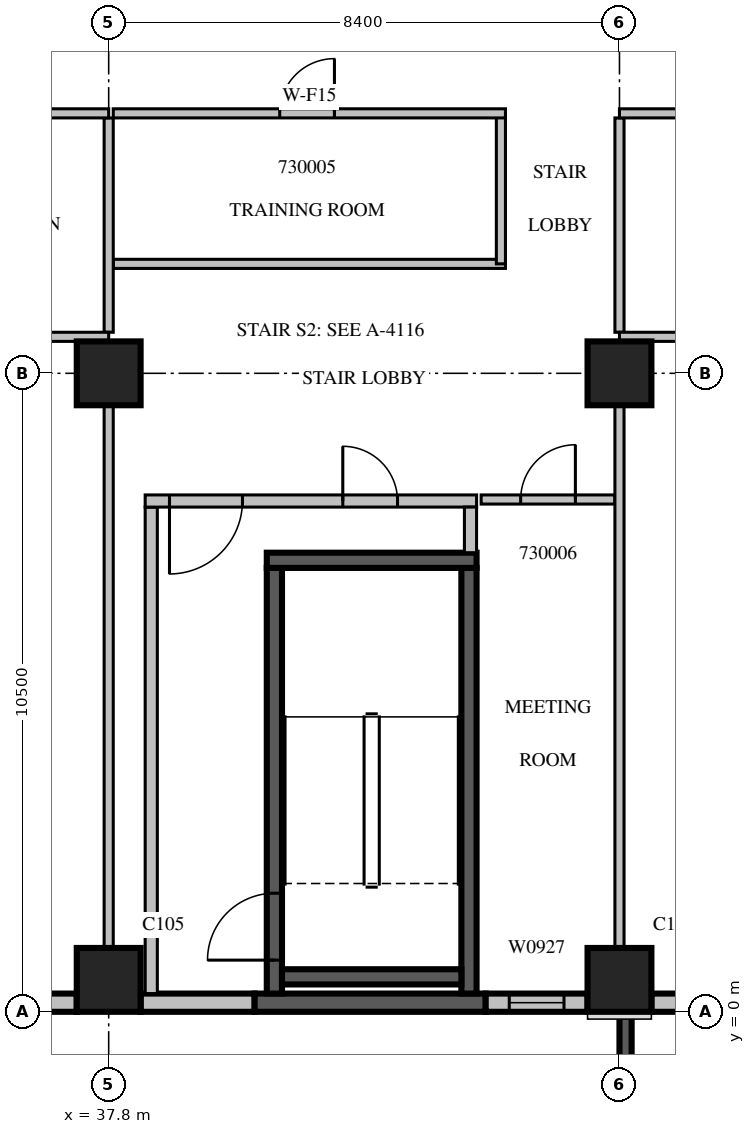
"""IFC4 building model, lengths in metres.
Left out: names, types, materials, properties, quantities, classifications, styles, units other than length and angle.
Written with IfcOpenShell. Run it as: python <this file> out.ifc"""

import sys

from ifc_helpers import new_model, si_unit, direction, frame, frame_2d, origin, origin_2d, place, context, subcontext, project, spatial, rectangle, extrude, source, transform, mapped, element, fill, save


model = new_model("IFC4")
c1 = context("Model", 3, precision=1e-05, world=origin(), true_north=direction((0.0, 1.0)))
c2 = subcontext(c1, "Body", "Model", "MODEL_VIEW")
j1 = project(units=[si_unit("LENGTHUNIT", "METRE"), si_unit("PLANEANGLEUNIT", "RADIAN")], contexts=[c1])
p1 = place(None, origin())
s1 = spatial("IfcSite", under=j1, at=p1, CompositionType="ELEMENT")
p2 = place(p1, origin())
s2 = spatial("IfcBuilding", under=s1, at=p2, CompositionType="ELEMENT")
p3 = place(p2, frame((0.0, 0.0, 137.1)))
s3 = spatial("IfcBuildingStorey", under=s2, at=p3, CompositionType="ELEMENT", Elevation=137.1)
m1 = source(origin(), c2, "Body", "SweptSolid", [
    extrude(rectangle(XDim=1.05, YDim=1.05, at=origin_2d()), origin(), (0.0, 0.0, 1.0), 4.2),
])
for number, where, z_axis, x_axis in (
    (1, (37.8, 0.525, 0.0), (0.0, 0.0, 1.0), (1.0, 0.0, 0.0)),
    (2, (46.2, 0.525, 0.0), (0.0, 0.0, 1.0), (1.0, 0.0, 0.0)),
    (3, (37.8, 10.5, 0.0), (0.0, 0.0, 1.0), (1.0, 0.0, 0.0)),
    (4, (46.2, 10.5, 0.0), (0.0, 0.0, 1.0), (1.0, 0.0, 0.0)),
):
    element("IfcColumn", number, at=place(p3, frame(where, z_axis=z_axis, x_axis=x_axis)), inside=s3, PredefinedType="COLUMN", context=c2, shape_type="MappedRepresentation", body=[
        mapped(m1, transform((0.0, 0.0, 0.0), scale=1.0)),
    ])
m2 = source(origin(), c2, "Body", "SweptSolid", [
    extrude(rectangle(XDim=3.9, YDim=0.2, at=frame_2d((1.95, 0.0))), origin(), (0.0, 0.0, 1.0), 3.8),
])
p4 = place(p3, frame((46.3, 0.0, 0.0), z_axis=(0.0, 0.0, 1.0), x_axis=(0.0, -1.0, 0.0)))
e5 = element("IfcWall", 5, at=p4, inside=s3, PredefinedType="SOLIDWALL", context=c2, shape_type="MappedRepresentation", body=[
    mapped(m2, transform((0.0, 0.0, 0.0), scale=1.0)),
])
m3 = source(origin(), c2, "Body", "SweptSolid", [
    extrude(rectangle(XDim=2.4, YDim=2.7, at=frame_2d((1.2, 1.35))), frame((0.0, 0.11, 0.0), z_axis=(0.0, -1.0, 0.0), x_axis=(1.0, 0.0, 0.0)), (0.0, 0.0, 1.0), 0.22),
])
p5 = place(p4, frame((0.75, 0.0, 0.6)))
e6 = element("IfcOpeningElement", 6, at=p5, cuts=e5, PredefinedType="OPENING", context=c2, shape_type="MappedRepresentation", body=[
    mapped(m3, transform((0.0, 0.0, 0.0), scale=1.0)),
])
m4 = source(origin(), c2, "Body", "SweptSolid", [
    extrude(rectangle(XDim=7.35, YDim=0.3, at=frame_2d((3.675, 0.0))), origin(), (0.0, 0.0, 1.0), 3.8),
])
p6 = place(p3, frame((29.925, 0.15, 0.0), z_axis=(0.0, 0.0, 1.0), x_axis=(1.0, 0.0, 0.0)))
e7 = element("IfcWall", 7, at=p6, inside=s3, PredefinedType="STANDARD", context=c2, shape_type="MappedRepresentation", body=[
    mapped(m4, transform((0.0, 0.0, 0.0), scale=1.0)),
])
m5 = source(origin(), c2, "Body", "SweptSolid", [
    extrude(rectangle(XDim=2.4, YDim=2.7, at=frame_2d((1.2, 1.35))), frame((0.0, 0.16, 0.0), z_axis=(0.0, -1.0, 0.0), x_axis=(1.0, 0.0, 0.0)), (0.0, 0.0, 1.0), 0.32),
])
p7 = place(p6, frame((2.575, 0.0, 0.6)))
e8 = element("IfcOpeningElement", 8, at=p7, cuts=e7, PredefinedType="OPENING", context=c2, shape_type="MappedRepresentation", body=[
    mapped(m5, transform((0.0, 0.0, 0.0), scale=1.0)),
])
m6 = source(origin(), c2, "Body", "SweptSolid", [
    extrude(rectangle(XDim=1.875, YDim=0.3, at=frame_2d((0.938, 0.0))), origin(), (0.0, 0.0, 1.0), 3.8),
])
p8 = place(p3, frame((38.325, 0.15, 0.0), z_axis=(0.0, 0.0, 1.0), x_axis=(1.0, 0.0, 0.0)))
e9 = element("IfcWall", 9, at=p8, inside=s3, PredefinedType="STANDARD", context=c2, shape_type="MappedRepresentation", body=[
    mapped(m6, transform((0.0, 0.0, 0.0), scale=1.0)),
])
m7 = source(origin(), c2, "Body", "SweptSolid", [
    extrude(rectangle(XDim=3.8, YDim=0.3, at=frame_2d((1.9, 0.0))), origin(), (0.0, 0.0, 1.0), 3.8),
])
p9 = place(p3, frame((40.2, 0.15, 0.0), z_axis=(0.0, 0.0, 1.0), x_axis=(1.0, 0.0, 0.0)))
e10 = element("IfcWall", 10, at=p9, inside=s3, PredefinedType="SOLIDWALL", context=c2, shape_type="MappedRepresentation", body=[
    mapped(m7, transform((0.0, 0.0, 0.0), scale=1.0)),
])
m8 = source(origin(), c2, "Body", "SweptSolid", [
    extrude(rectangle(XDim=1.675, YDim=0.3, at=frame_2d((0.838, 0.0))), origin(), (0.0, 0.0, 1.0), 3.8),
])
p10 = place(p3, frame((44.0, 0.15, 0.0), z_axis=(0.0, 0.0, 1.0), x_axis=(1.0, 0.0, 0.0)))
e11 = element("IfcWall", 11, at=p10, inside=s3, PredefinedType="STANDARD", context=c2, shape_type="MappedRepresentation", body=[
    mapped(m8, transform((0.0, 0.0, 0.0), scale=1.0)),
])
m9 = source(origin(), c2, "Body", "SweptSolid", [
    extrude(rectangle(XDim=0.9, YDim=2.7, at=frame_2d((0.45, 1.35))), frame((0.0, 0.16, 0.0), z_axis=(0.0, -1.0, 0.0), x_axis=(1.0, 0.0, 0.0)), (0.0, 0.0, 1.0), 0.32),
])
p11 = place(p10, frame((0.388, 0.0, 0.6)))
e12 = element("IfcOpeningElement", 12, at=p11, cuts=e11, PredefinedType="OPENING", context=c2, shape_type="MappedRepresentation", body=[
    mapped(m9, transform((0.0, 0.0, 0.0), scale=1.0)),
])
m10 = source(origin(), c2, "Body", "SweptSolid", [
    extrude(rectangle(XDim=4.83, YDim=0.3, at=frame_2d((2.415, 0.0))), origin(), (0.0, 0.0, 1.0), 3.8),
])
p12 = place(p3, frame((46.725, 0.15, 0.0), z_axis=(0.0, 0.0, 1.0), x_axis=(1.0, 0.0, 0.0)))
e13 = element("IfcWall", 13, at=p12, inside=s3, PredefinedType="STANDARD", context=c2, shape_type="MappedRepresentation", body=[
    mapped(m10, transform((0.0, 0.0, 0.0), scale=1.0)),
])
m11 = source(origin(), c2, "Body", "SweptSolid", [
    extrude(rectangle(XDim=1.0, YDim=2.1, at=frame_2d((0.5, 1.05))), frame((0.0, 0.16, 0.0), z_axis=(0.0, -1.0, 0.0), x_axis=(1.0, 0.0, 0.0)), (0.0, 0.0, 1.0), 0.32),
])
p13 = place(p12, frame((1.915, 0.0, 0.0)))
e14 = element("IfcOpeningElement", 14, at=p13, cuts=e13, PredefinedType="OPENING", context=c2, shape_type="MappedRepresentation", body=[
    mapped(m11, transform((0.0, 0.0, 0.0), scale=1.0)),
])
m12 = source(origin(), c2, "Body", "SweptSolid", [
    extrude(rectangle(XDim=7.0, YDim=0.25, at=frame_2d((3.5, 0.0))), origin(), (0.0, 0.0, 1.0), 3.8),
])
p14 = place(p3, frame((40.525, 0.3, 0.0), z_axis=(0.0, 0.0, 1.0), x_axis=(0.0, 1.0, 0.0)))
e15 = element("IfcWall", 15, at=p14, inside=s3, PredefinedType="SOLIDWALL", context=c2, shape_type="MappedRepresentation", body=[
    mapped(m12, transform((0.0, 0.0, 0.0), scale=1.0)),
])
m13 = source(origin(), c2, "Body", "SweptSolid", [
    extrude(rectangle(XDim=1.1, YDim=2.1, at=frame_2d((0.55, 1.05))), frame((0.0, 0.135, 0.0), z_axis=(0.0, -1.0, 0.0), x_axis=(1.0, 0.0, 0.0)), (0.0, 0.0, 1.0), 0.27),
])
p15 = place(p14, frame((0.55, 0.0, 0.0)))
e16 = element("IfcOpeningElement", 16, at=p15, cuts=e15, PredefinedType="OPENING", context=c2, shape_type="MappedRepresentation", body=[
    mapped(m13, transform((0.0, 0.0, 0.0), scale=1.0)),
])
p16 = place(p3, frame((43.725, 0.3, 0.0), z_axis=(0.0, 0.0, 1.0), x_axis=(0.0, 1.0, 0.0)))
e17 = element("IfcWall", 17, at=p16, inside=s3, PredefinedType="SOLIDWALL", context=c2, shape_type="MappedRepresentation", body=[
    mapped(m12, transform((0.0, 0.0, 0.0), scale=1.0)),
])
m14 = source(origin(), c2, "Body", "SweptSolid", [
    extrude(rectangle(XDim=3.45, YDim=0.25, at=frame_2d((1.725, 0.0))), origin(), (0.0, 0.0, 1.0), 3.8),
])
p17 = place(p3, frame((40.4, 7.425, 0.0), z_axis=(0.0, 0.0, 1.0), x_axis=(1.0, 0.0, 0.0)))
e18 = element("IfcWall", 18, at=p17, inside=s3, PredefinedType="SOLIDWALL", context=c2, shape_type="MappedRepresentation", body=[
    mapped(m14, transform((0.0, 0.0, 0.0), scale=1.0)),
])
m15 = source(origin(), c2, "Body", "SweptSolid", [
    extrude(rectangle(XDim=2.95, YDim=0.25, at=frame_2d((1.475, 0.0))), origin(), (0.0, 0.0, 1.0), 3.8),
])
p18 = place(p3, frame((40.65, 0.575, 0.0), z_axis=(0.0, 0.0, 1.0), x_axis=(1.0, 0.0, 0.0)))
e19 = element("IfcWall", 19, at=p18, inside=s3, PredefinedType="SOLIDWALL", context=c2, shape_type="MappedRepresentation", body=[
    mapped(m15, transform((0.0, 0.0, 0.0), scale=1.0)),
])
m16 = source(origin(), c2, "Body", "SweptSolid", [
    extrude(rectangle(XDim=8.0, YDim=0.2, at=frame_2d((4.0, 0.0))), origin(), (0.0, 0.0, 1.0), 3.8),
])
p19 = place(p3, frame((38.5, 0.3, 0.0), z_axis=(0.0, 0.0, 1.0), x_axis=(0.0, 1.0, 0.0)))
e20 = element("IfcWall", 20, at=p19, inside=s3, PredefinedType="PARTITIONING", context=c2, shape_type="MappedRepresentation", body=[
    mapped(m16, transform((0.0, 0.0, 0.0), scale=1.0)),
])
m17 = source(origin(), c2, "Body", "SweptSolid", [
    extrude(rectangle(XDim=5.45, YDim=0.2, at=frame_2d((2.725, 0.0))), origin(), (0.0, 0.0, 1.0), 3.8),
])
p20 = place(p3, frame((38.4, 8.4, 0.0), z_axis=(0.0, 0.0, 1.0), x_axis=(1.0, 0.0, 0.0)))
e21 = element("IfcWall", 21, at=p20, inside=s3, PredefinedType="PARTITIONING", context=c2, shape_type="MappedRepresentation", body=[
    mapped(m17, transform((0.0, 0.0, 0.0), scale=1.0)),
])
m18 = source(origin(), c2, "Body", "SweptSolid", [
    extrude(rectangle(XDim=1.2, YDim=2.1, at=frame_2d((0.6, 1.05))), frame((0.0, 0.11, 0.0), z_axis=(0.0, -1.0, 0.0), x_axis=(1.0, 0.0, 0.0)), (0.0, 0.0, 1.0), 0.22),
])
p21 = place(p20, frame((0.4, 0.0, 0.0)))
e22 = element("IfcOpeningElement", 22, at=p21, cuts=e21, PredefinedType="OPENING", context=c2, shape_type="MappedRepresentation", body=[
    mapped(m18, transform((0.0, 0.0, 0.0), scale=1.0)),
])
m19 = source(origin(), c2, "Body", "SweptSolid", [
    extrude(rectangle(XDim=0.9, YDim=2.1, at=frame_2d((0.45, 1.05))), frame((0.0, 0.11, 0.0), z_axis=(0.0, -1.0, 0.0), x_axis=(1.0, 0.0, 0.0)), (0.0, 0.0, 1.0), 0.22),
])
p22 = place(p20, frame((3.25, 0.0, 0.0)))
e23 = element("IfcOpeningElement", 23, at=p22, cuts=e21, PredefinedType="OPENING", context=c2, shape_type="MappedRepresentation", body=[
    mapped(m19, transform((0.0, 0.0, 0.0), scale=1.0)),
])
m20 = source(origin(), c2, "Body", "SweptSolid", [
    extrude(rectangle(XDim=0.75, YDim=0.2, at=frame_2d((0.375, 0.0))), origin(), (0.0, 0.0, 1.0), 3.8),
])
p23 = place(p3, frame((43.75, 7.55, 0.0), z_axis=(0.0, 0.0, 1.0), x_axis=(0.0, 1.0, 0.0)))
e24 = element("IfcWall", 24, at=p23, inside=s3, PredefinedType="PARTITIONING", context=c2, shape_type="MappedRepresentation", body=[
    mapped(m20, transform((0.0, 0.0, 0.0), scale=1.0)),
])
m21 = source(origin(), c2, "Body", "SweptSolid", [
    extrude(rectangle(XDim=6.45, YDim=0.15, at=frame_2d((3.225, 0.0))), origin(), (0.0, 0.0, 1.0), 3.8),
])
p24 = place(p3, frame((37.875, 12.3, 0.0), z_axis=(0.0, 0.0, 1.0), x_axis=(1.0, 0.0, 0.0)))
e25 = element("IfcWall", 25, at=p24, inside=s3, PredefinedType="PARTITIONING", context=c2, shape_type="MappedRepresentation", body=[
    mapped(m21, transform((0.0, 0.0, 0.0), scale=1.0)),
])
m22 = source(origin(), c2, "Body", "SweptSolid", [
    extrude(rectangle(XDim=2.475, YDim=0.15, at=frame_2d((1.238, 0.0))), origin(), (0.0, 0.0, 1.0), 3.8),
])
p25 = place(p3, frame((44.25, 12.3, 0.0), z_axis=(0.0, 0.0, 1.0), x_axis=(0.0, 1.0, 0.0)))
e26 = element("IfcWall", 26, at=p25, inside=s3, PredefinedType="PARTITIONING", context=c2, shape_type="MappedRepresentation", body=[
    mapped(m22, transform((0.0, 0.0, 0.0), scale=1.0)),
])
p26 = place(p3, frame((44.325, 14.775, 0.0), z_axis=(0.0, 0.0, 1.0), x_axis=(-1.0, 0.0, 0.0)))
e27 = element("IfcWall", 27, at=p26, inside=s3, PredefinedType="PARTITIONING", context=c2, shape_type="MappedRepresentation", body=[
    mapped(m21, transform((0.0, 0.0, 0.0), scale=1.0)),
])
m23 = source(origin(), c2, "Body", "SweptSolid", [
    extrude(rectangle(XDim=0.9, YDim=2.1, at=frame_2d((0.45, 1.05))), frame((0.0, 0.085, 0.0), z_axis=(0.0, -1.0, 0.0), x_axis=(1.0, 0.0, 0.0)), (0.0, 0.0, 1.0), 0.17),
])
p27 = place(p26, frame((2.812, 0.0, 0.0)))
e28 = element("IfcOpeningElement", 28, at=p27, cuts=e27, PredefinedType="OPENING", context=c2, shape_type="MappedRepresentation", body=[
    mapped(m23, transform((0.0, 0.0, 0.0), scale=1.0)),
])
m24 = source(origin(), c2, "Body", "SweptSolid", [
    extrude(rectangle(XDim=2.2, YDim=0.15, at=frame_2d((1.1, 0.0))), origin(), (0.0, 0.0, 1.0), 3.8),
])
p28 = place(p3, frame((46.125, 8.425, 0.0), z_axis=(0.0, 0.0, 1.0), x_axis=(-1.0, 0.0, 0.0)))
e29 = element("IfcWall", 29, at=p28, inside=s3, PredefinedType="PARTITIONING", context=c2, shape_type="MappedRepresentation", body=[
    mapped(m24, transform((0.0, 0.0, 0.0), scale=1.0)),
])
p29 = place(p28, frame((0.65, 0.0, 0.0)))
e30 = element("IfcOpeningElement", 30, at=p29, cuts=e29, PredefinedType="OPENING", context=c2, shape_type="MappedRepresentation", body=[
    mapped(m23, transform((0.0, 0.0, 0.0), scale=1.0)),
])
m25 = source(origin(), c2, "Body", "SweptSolid", [
    extrude(rectangle(XDim=8.927, YDim=0.15, at=frame_2d((4.463, 0.0))), origin(), (0.0, 0.0, 1.0), 3.8),
])
p30 = place(p3, frame((37.8, 1.049, 0.0), z_axis=(0.0, 0.0, 1.0), x_axis=(0.0, 1.0, 0.0)))
e31 = element("IfcWall", 31, at=p30, inside=s3, PredefinedType="PARTITIONING", context=c2, shape_type="MappedRepresentation", body=[
    mapped(m25, transform((0.0, 0.0, 0.0), scale=1.0)),
])
m26 = source(origin(), c2, "Body", "SweptSolid", [
    extrude(rectangle(XDim=3.525, YDim=0.15, at=frame_2d((1.762, 0.0))), origin(), (0.0, 0.0, 1.0), 3.8),
])
p31 = place(p3, frame((37.8, 11.175, 0.0), z_axis=(0.0, 0.0, 1.0), x_axis=(0.0, 1.0, 0.0)))
e32 = element("IfcWall", 32, at=p31, inside=s3, PredefinedType="PARTITIONING", context=c2, shape_type="MappedRepresentation", body=[
    mapped(m26, transform((0.0, 0.0, 0.0), scale=1.0)),
])
m27 = source(origin(), c2, "Body", "SweptSolid", [
    extrude(rectangle(XDim=8.4, YDim=0.15, at=frame_2d((4.2, 0.0))), origin(), (0.0, 0.0, 1.0), 3.8),
])
p32 = place(p3, frame((37.8, 11.1, 0.0), z_axis=(0.0, 0.0, 1.0), x_axis=(-1.0, 0.0, 0.0)))
e33 = element("IfcWall", 33, at=p32, inside=s3, PredefinedType="PARTITIONING", context=c2, shape_type="MappedRepresentation", body=[
    mapped(m27, transform((0.0, 0.0, 0.0), scale=1.0)),
])
m28 = source(origin(), c2, "Body", "SweptSolid", [
    extrude(rectangle(XDim=1.1, YDim=2.1, at=frame_2d((0.55, 1.05))), frame((0.0, 0.085, 0.0), z_axis=(0.0, -1.0, 0.0), x_axis=(1.0, 0.0, 0.0)), (0.0, 0.0, 1.0), 0.17),
])
p33 = place(p32, frame((1.345, 0.0, 0.0)))
e34 = element("IfcOpeningElement", 34, at=p33, cuts=e33, PredefinedType="OPENING", context=c2, shape_type="MappedRepresentation", body=[
    mapped(m28, transform((0.0, 0.0, 0.0), scale=1.0)),
])
p34 = place(p3, frame((46.2, 1.049, 0.0), z_axis=(0.0, 0.0, 1.0), x_axis=(0.0, 1.0, 0.0)))
e35 = element("IfcWall", 35, at=p34, inside=s3, PredefinedType="PARTITIONING", context=c2, shape_type="MappedRepresentation", body=[
    mapped(m25, transform((0.0, 0.0, 0.0), scale=1.0)),
])
p35 = place(p3, frame((46.2, 11.175, 0.0), z_axis=(0.0, 0.0, 1.0), x_axis=(0.0, 1.0, 0.0)))
e36 = element("IfcWall", 36, at=p35, inside=s3, PredefinedType="PARTITIONING", context=c2, shape_type="MappedRepresentation", body=[
    mapped(m26, transform((0.0, 0.0, 0.0), scale=1.0)),
])
m29 = source(origin(), c2, "Body", "SweptSolid", [
    extrude(rectangle(XDim=24.9, YDim=0.15, at=frame_2d((12.45, 0.0))), origin(), (0.0, 0.0, 1.0), 3.8),
])
p36 = place(p3, frame((71.1, 11.1, 0.0), z_axis=(0.0, 0.0, 1.0), x_axis=(-1.0, 0.0, 0.0)))
e37 = element("IfcWall", 37, at=p36, inside=s3, PredefinedType="PARTITIONING", context=c2, shape_type="MappedRepresentation", body=[
    mapped(m29, transform((0.0, 0.0, 0.0), scale=1.0)),
])
p37 = place(p36, frame((19.988, 0.0, 0.0)))
e38 = element("IfcOpeningElement", 38, at=p37, cuts=e37, PredefinedType="OPENING", context=c2, shape_type="MappedRepresentation", body=[
    mapped(m28, transform((0.0, 0.0, 0.0), scale=1.0)),
])
p38 = place(p36, frame((16.497, 0.0, 0.0)))
e39 = element("IfcOpeningElement", 39, at=p38, cuts=e37, PredefinedType="OPENING", context=c2, shape_type="MappedRepresentation", body=[
    mapped(m28, transform((0.0, 0.0, 0.0), scale=1.0)),
])
p39 = place(p36, frame((2.028, 0.0, 0.0)))
e40 = element("IfcOpeningElement", 40, at=p39, cuts=e37, PredefinedType="OPENING", context=c2, shape_type="MappedRepresentation", body=[
    mapped(m23, transform((0.0, 0.0, 0.0), scale=1.0)),
])
p40 = place(p3, frame((37.8, 14.775, 0.0), z_axis=(0.0, 0.0, 1.0), x_axis=(-1.0, 0.0, 0.0)))
e41 = element("IfcWall", 41, at=p40, inside=s3, PredefinedType="PARTITIONING", context=c2, shape_type="MappedRepresentation", body=[
    mapped(m27, transform((0.0, 0.0, 0.0), scale=1.0)),
])
p41 = place(p40, frame((1.12, 0.0, 0.0)))
e42 = element("IfcOpeningElement", 42, at=p41, cuts=e41, PredefinedType="OPENING", context=c2, shape_type="MappedRepresentation", body=[
    mapped(m28, transform((0.0, 0.0, 0.0), scale=1.0)),
])
p42 = place(p40, frame((6.744, 0.0, 0.0)))
e43 = element("IfcOpeningElement", 43, at=p42, cuts=e41, PredefinedType="OPENING", context=c2, shape_type="MappedRepresentation", body=[
    mapped(m23, transform((0.0, 0.0, 0.0), scale=1.0)),
])
p43 = place(p40, frame((4.214, 0.0, 0.0)))
e44 = element("IfcOpeningElement", 44, at=p43, cuts=e41, PredefinedType="OPENING", context=c2, shape_type="MappedRepresentation", body=[
    mapped(m23, transform((0.0, 0.0, 0.0), scale=1.0)),
])
p44 = place(p3, frame((71.1, 14.775, 0.0), z_axis=(0.0, 0.0, 1.0), x_axis=(-1.0, 0.0, 0.0)))
e45 = element("IfcWall", 45, at=p44, inside=s3, PredefinedType="PARTITIONING", context=c2, shape_type="MappedRepresentation", body=[
    mapped(m29, transform((0.0, 0.0, 0.0), scale=1.0)),
])
p45 = place(p44, frame((19.754, 0.0, 0.0)))
e46 = element("IfcOpeningElement", 46, at=p45, cuts=e45, PredefinedType="OPENING", context=c2, shape_type="MappedRepresentation", body=[
    mapped(m28, transform((0.0, 0.0, 0.0), scale=1.0)),
])
p46 = place(p44, frame((22.794, 0.0, 0.0)))
e47 = element("IfcOpeningElement", 47, at=p46, cuts=e45, PredefinedType="OPENING", context=c2, shape_type="MappedRepresentation", body=[
    mapped(m23, transform((0.0, 0.0, 0.0), scale=1.0)),
])
p47 = place(p44, frame((16.772, 0.0, 0.0)))
e48 = element("IfcOpeningElement", 48, at=p47, cuts=e45, PredefinedType="OPENING", context=c2, shape_type="MappedRepresentation", body=[
    mapped(m28, transform((0.0, 0.0, 0.0), scale=1.0)),
])
p48 = place(p44, frame((13.886, 0.0, 0.0)))
e49 = element("IfcOpeningElement", 49, at=p48, cuts=e45, PredefinedType="OPENING", context=c2, shape_type="MappedRepresentation", body=[
    mapped(m23, transform((0.0, 0.0, 0.0), scale=1.0)),
])
p49 = place(p44, frame((11.382, 0.0, 0.0)))
e50 = element("IfcOpeningElement", 50, at=p49, cuts=e45, PredefinedType="OPENING", context=c2, shape_type="MappedRepresentation", body=[
    mapped(m23, transform((0.0, 0.0, 0.0), scale=1.0)),
])
p50 = place(p44, frame((9.2, 0.0, 0.0)))
e51 = element("IfcOpeningElement", 51, at=p50, cuts=e45, PredefinedType="OPENING", context=c2, shape_type="MappedRepresentation", body=[
    mapped(m23, transform((0.0, 0.0, 0.0), scale=1.0)),
])
p51 = place(p44, frame((7.522, 0.0, 0.0)))
e52 = element("IfcOpeningElement", 52, at=p51, cuts=e45, PredefinedType="OPENING", context=c2, shape_type="MappedRepresentation", body=[
    mapped(m23, transform((0.0, 0.0, 0.0), scale=1.0)),
])
p52 = place(p44, frame((0.976, 0.0, 0.0)))
e53 = element("IfcOpeningElement", 53, at=p52, cuts=e45, PredefinedType="OPENING", context=c2, shape_type="MappedRepresentation", body=[
    mapped(m28, transform((0.0, 0.0, 0.0), scale=1.0)),
])
p53 = place(p44, frame((4.743, 0.0, 0.0)))
e54 = element("IfcOpeningElement", 54, at=p53, cuts=e45, PredefinedType="OPENING", context=c2, shape_type="MappedRepresentation", body=[
    mapped(m23, transform((0.0, 0.0, 0.0), scale=1.0)),
])
m30 = source(origin(), c2, "Body", "SweptSolid", [
    extrude(rectangle(XDim=0.9, YDim=2.7, at=frame_2d((0.45, 1.35))), frame((0.0, 0.03, 0.0), z_axis=(0.0, -1.0, 0.0), x_axis=(1.0, 0.0, 0.0)), (0.0, 0.0, 1.0), 0.06),
])
p54 = place(p11, origin())
e55 = element("IfcWindow", 55, at=p54, inside=s3, PartitioningType="SINGLE_PANEL", PredefinedType="WINDOW", context=c2, shape_type="MappedRepresentation", body=[
    mapped(m30, transform((0.0, 0.0, 0.0), scale=1.0)),
])
fill(e12, e55)
m31 = source(origin(), c2, "Body", "SweptSolid", [
    extrude(rectangle(XDim=1.1, YDim=2.1, at=frame_2d((0.55, 1.05))), frame((0.0, 0.025, 0.0), z_axis=(0.0, -1.0, 0.0), x_axis=(1.0, 0.0, 0.0)), (0.0, 0.0, 1.0), 0.05),
])
p55 = place(p15, origin())
e56 = element("IfcDoor", 56, at=p55, inside=s3, OperationType="SINGLE_SWING_LEFT", PredefinedType="DOOR", context=c2, shape_type="MappedRepresentation", body=[
    mapped(m31, transform((0.0, 0.0, 0.0), scale=1.0)),
])
fill(e16, e56)
m32 = source(origin(), c2, "Body", "SweptSolid", [
    extrude(rectangle(XDim=1.2, YDim=2.1, at=frame_2d((0.6, 1.05))), frame((0.0, 0.025, 0.0), z_axis=(0.0, -1.0, 0.0), x_axis=(1.0, 0.0, 0.0)), (0.0, 0.0, 1.0), 0.05),
])
p56 = place(p21, origin())
e57 = element("IfcDoor", 57, at=p56, inside=s3, OperationType="SINGLE_SWING_RIGHT", PredefinedType="DOOR", context=c2, shape_type="MappedRepresentation", body=[
    mapped(m32, transform((0.0, 0.0, 0.0), scale=1.0)),
])
fill(e22, e57)
m33 = source(origin(), c2, "Body", "SweptSolid", [
    extrude(rectangle(XDim=0.9, YDim=2.1, at=frame_2d((0.45, 1.05))), frame((0.0, 0.025, 0.0), z_axis=(0.0, -1.0, 0.0), x_axis=(1.0, 0.0, 0.0)), (0.0, 0.0, 1.0), 0.05),
])
p57 = place(p22, origin())
e58 = element("IfcDoor", 58, at=p57, inside=s3, OperationType="SINGLE_SWING_LEFT", PredefinedType="DOOR", context=c2, shape_type="MappedRepresentation", body=[
    mapped(m33, transform((0.0, 0.0, 0.0), scale=1.0)),
])
fill(e23, e58)
p58 = place(p27, origin())
e59 = element("IfcDoor", 59, at=p58, inside=s3, OperationType="SINGLE_SWING_RIGHT", PredefinedType="DOOR", context=c2, shape_type="MappedRepresentation", body=[
    mapped(m33, transform((0.0, 0.0, 0.0), scale=1.0)),
])
fill(e28, e59)
p59 = place(p29, origin())
e60 = element("IfcDoor", 60, at=p59, inside=s3, OperationType="SINGLE_SWING_RIGHT", PredefinedType="DOOR", context=c2, shape_type="MappedRepresentation", body=[
    mapped(m33, transform((0.0, 0.0, 0.0), scale=1.0)),
])
fill(e30, e60)
save(model, sys.argv[1])
